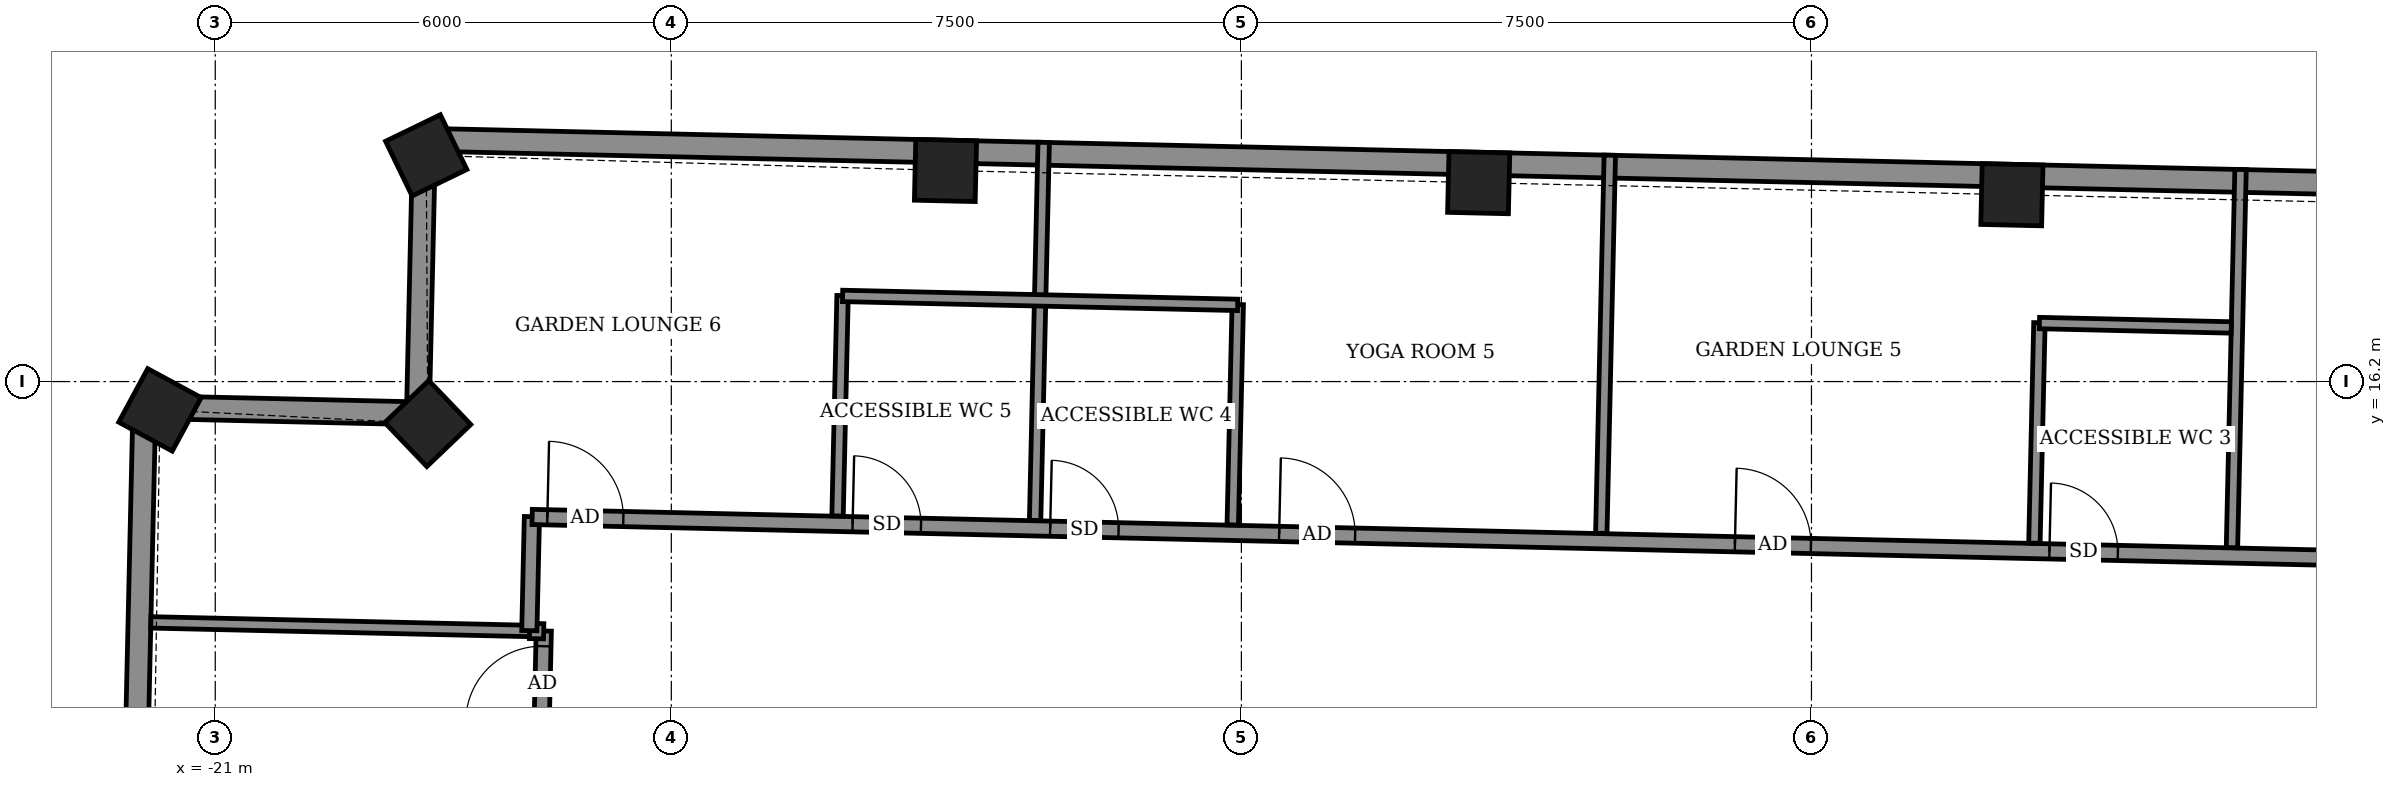
"""IFC4 building model, lengths in metres.
Left out: names, types, materials, properties, quantities, classifications, styles, units other than length and angle.
Written with IfcOpenShell. Run it as: python <this file> out.ifc"""

import sys

from ifc_helpers import new_model, si_unit, direction, frame, frame_2d, origin, origin_2d, place, context, subcontext, project, spatial, rectangle, extrude, element, fill, save


model = new_model("IFC4")
c1 = context("Model", 3, precision=1e-05, world=origin(), true_north=direction((0.0, 1.0)))
c2 = subcontext(c1, "Body", "Model", "MODEL_VIEW")
j1 = project(units=[si_unit("LENGTHUNIT", "METRE"), si_unit("PLANEANGLEUNIT", "RADIAN")], contexts=[c1])
p1 = place(None, origin())
s1 = spatial("IfcSite", under=j1, at=p1, CompositionType="ELEMENT")
p2 = place(p1, origin())
s2 = spatial("IfcBuilding", under=s1, at=p2, CompositionType="ELEMENT")
p3 = place(p2, frame((0.0, 0.0, 350.7)))
s3 = spatial("IfcBuildingStorey", under=s2, at=p3, CompositionType="ELEMENT", Elevation=350.7)
for number, where, z_axis, x_axis in (
    (1, (2.637, 18.658, -0.55), (0.0, 0.0, 1.0), (-1.0, 0.023, 0.0)),
    (2, (-4.378, 18.817, -0.55), (0.0, 0.0, 1.0), (-1.0, 0.023, 0.0)),
    (3, (-11.393, 18.977, -0.55), (0.0, 0.0, 1.0), (-1.0, 0.023, 0.0)),
    (4, (-18.225, 19.176, -0.55), (0.0, 0.0, 1.0), (-0.9, -0.436, 0.0)),
    (5, (-18.204, 15.648, -0.55), (0.0, 0.0, 1.0), (-0.723, -0.691, 0.0)),
    (6, (-21.727, 15.828, -0.55), (0.0, 0.0, 1.0), (-0.476, -0.879, 0.0)),
):
    element("IfcColumn", number, at=place(p3, frame(where, z_axis=z_axis, x_axis=x_axis)), inside=s3, PredefinedType="COLUMN", context=c2, shape_type="SweptSolid", body=[
        extrude(rectangle(XDim=0.8, YDim=0.8, at=origin_2d()), origin(), (0.0, 0.0, 1.0), 3.6),
    ])
p4 = place(p3, frame((23.537, 18.434, 0.0), z_axis=(0.0, 0.0, 1.0), x_axis=(-0.999742787513, 0.022679480066, 0.0)))
e7 = element("IfcWall", 7, at=p4, inside=s3, PredefinedType="SOLIDWALL", context=c2, shape_type="SweptSolid", body=[
    extrude(rectangle(XDim=41.8, YDim=0.3, at=frame_2d((20.9, 0.0))), origin(), (0.0, 0.0, 1.0), 2.5),
])
for number, where, z_axis, x_axis in (
    (8, (-18.252, 19.382, 0.0), (0.0, 0.0, 1.0), (-0.023, -1.0, 0.0)),
    (9, (-18.334, 15.783, 0.0), (0.0, 0.0, 1.0), (-1.0, 0.023, 0.0)),
):
    element("IfcWall", number, at=place(p3, frame(where, z_axis=z_axis, x_axis=x_axis)), inside=s3, PredefinedType="SOLIDWALL", context=c2, shape_type="SweptSolid", body=[
        extrude(rectangle(XDim=3.6, YDim=0.3, at=frame_2d((1.8, 0.0))), origin(), (0.0, 0.0, 1.0), 2.55),
    ])
p5 = place(p3, frame((-21.933, 15.865, 0.0), z_axis=(0.0, 0.0, 1.0), x_axis=(-0.022652795902, -0.999743392495, 0.0)))
e10 = element("IfcWall", 10, at=p5, inside=s3, PredefinedType="SOLIDWALL", context=c2, shape_type="SweptSolid", body=[
    extrude(rectangle(XDim=7.275, YDim=0.3, at=frame_2d((3.637, 0.0))), origin(), (0.0, 0.0, 1.0), 2.55),
])
p6 = place(p3, frame((-17.247, -12.149, 0.0), z_axis=(0.0, 0.0, 1.0), x_axis=(0.022696191528, 0.999742408268, 0.0)))
e11 = element("IfcWall", 11, at=p6, inside=s3, PredefinedType="PARTITIONING", context=c2, shape_type="SweptSolid", body=[
    extrude(rectangle(XDim=25.074, YDim=0.2, at=frame_2d((12.537, 0.0))), origin(), (0.0, 0.0, 1.0), 3.05),
])
p7 = place(p6, frame((23.874, 0.0, 0.0)))
e12 = element("IfcOpeningElement", 12, at=p7, cuts=e11, PredefinedType="OPENING", context=c2, shape_type="SweptSolid", body=[
    extrude(rectangle(XDim=1.0, YDim=2.1, at=frame_2d((0.5, 1.05))), frame((0.0, 0.11, 0.0), z_axis=(0.0, -1.0, 0.0), x_axis=(1.0, 0.0, 0.0)), (0.0, 0.0, 1.0), 0.22),
])
p8 = place(p6, frame((18.896, 0.0, 0.0)))
e13 = element("IfcOpeningElement", 13, at=p8, cuts=e11, PredefinedType="OPENING", context=c2, shape_type="SweptSolid", body=[
    extrude(rectangle(XDim=1.0, YDim=2.1, at=frame_2d((0.5, 1.05))), frame((0.0, 0.11, 0.0), z_axis=(0.0, -1.0, 0.0), x_axis=(1.0, 0.0, 0.0)), (0.0, 0.0, 1.0), 0.22),
])
p9 = place(p6, frame((12.675, 0.0, 0.0)))
e14 = element("IfcOpeningElement", 14, at=p9, cuts=e11, PredefinedType="OPENING", context=c2, shape_type="SweptSolid", body=[
    extrude(rectangle(XDim=1.0, YDim=2.1, at=frame_2d((0.5, 1.05))), frame((0.0, 0.11, 0.0), z_axis=(0.0, -1.0, 0.0), x_axis=(1.0, 0.0, 0.0)), (0.0, 0.0, 1.0), 0.22),
])
p10 = place(p6, frame((8.775, 0.0, 0.0)))
e15 = element("IfcOpeningElement", 15, at=p10, cuts=e11, PredefinedType="OPENING", context=c2, shape_type="SweptSolid", body=[
    extrude(rectangle(XDim=0.9, YDim=2.1, at=frame_2d((0.45, 1.05))), frame((0.0, 0.11, 0.0), z_axis=(0.0, -1.0, 0.0), x_axis=(1.0, 0.0, 0.0)), (0.0, 0.0, 1.0), 0.22),
])
p11 = place(p6, frame((5.045, 0.0, 0.0)))
e16 = element("IfcOpeningElement", 16, at=p11, cuts=e11, PredefinedType="OPENING", context=c2, shape_type="SweptSolid", body=[
    extrude(rectangle(XDim=1.0, YDim=2.1, at=frame_2d((0.5, 1.05))), frame((0.0, 0.11, 0.0), z_axis=(0.0, -1.0, 0.0), x_axis=(1.0, 0.0, 0.0)), (0.0, 0.0, 1.0), 0.22),
])
p12 = place(p3, frame((-21.847, 13.032, 0.0), z_axis=(0.0, 0.0, 1.0), x_axis=(0.99974309766, -0.022665804241, 0.0)))
e17 = element("IfcWall", 17, at=p12, inside=s3, PredefinedType="PARTITIONING", context=c2, shape_type="SweptSolid", body=[
    extrude(rectangle(XDim=4.987, YDim=0.15, at=frame_2d((2.494, 0.0))), origin(), (0.0, 0.0, 1.0), 2.55),
])
p13 = place(p3, frame((-16.865, 12.919, 0.0), z_axis=(0.0, 0.0, 1.0), x_axis=(0.999779627982, -0.020992748094, 0.0)))
e18 = element("IfcWall", 18, at=p13, inside=s3, PredefinedType="PARTITIONING", context=c2, shape_type="SweptSolid", body=[
    extrude(rectangle(XDim=0.186, YDim=0.2, at=frame_2d((0.093, 0.0))), origin(), (0.0, 0.0, 1.0), 3.05),
])
p14 = place(p3, frame((-16.868, 12.923, 0.0), z_axis=(0.0, 0.0, 1.0), x_axis=(0.022617910375, 0.999744182344, 0.0)))
e19 = element("IfcWall", 19, at=p14, inside=s3, PredefinedType="PARTITIONING", context=c2, shape_type="SweptSolid", body=[
    extrude(rectangle(XDim=1.5, YDim=0.2, at=frame_2d((0.75, 0.0))), origin(), (0.0, 0.0, 1.0), 3.05),
])
p15 = place(p3, frame((-16.831, 14.419, 0.0), z_axis=(0.0, 0.0, 1.0), x_axis=(0.999742531431, -0.022690765715, 0.0)))
e20 = element("IfcWall", 20, at=p15, inside=s3, PredefinedType="PARTITIONING", context=c2, shape_type="SweptSolid", body=[
    extrude(rectangle(XDim=38.734, YDim=0.2, at=frame_2d((19.367, 0.0))), origin(), (0.0, 0.0, 1.0), 3.05),
])
p16 = place(p15, frame((35.977, 0.0, 0.0)))
e21 = element("IfcOpeningElement", 21, at=p16, cuts=e20, PredefinedType="OPENING", context=c2, shape_type="SweptSolid", body=[
    extrude(rectangle(XDim=1.0, YDim=2.1, at=frame_2d((0.5, 1.05))), frame((0.0, 0.11, 0.0), z_axis=(0.0, -1.0, 0.0), x_axis=(1.0, 0.0, 0.0)), (0.0, 0.0, 1.0), 0.22),
])
p17 = place(p15, frame((33.167, 0.0, 0.0)))
e22 = element("IfcOpeningElement", 22, at=p17, cuts=e20, PredefinedType="OPENING", context=c2, shape_type="SweptSolid", body=[
    extrude(rectangle(XDim=0.9, YDim=2.1, at=frame_2d((0.45, 1.05))), frame((0.0, 0.11, 0.0), z_axis=(0.0, -1.0, 0.0), x_axis=(1.0, 0.0, 0.0)), (0.0, 0.0, 1.0), 0.22),
])
p18 = place(p15, frame((28.467, 0.0, 0.0)))
e23 = element("IfcOpeningElement", 23, at=p18, cuts=e20, PredefinedType="OPENING", context=c2, shape_type="SweptSolid", body=[
    extrude(rectangle(XDim=1.0, YDim=2.1, at=frame_2d((0.5, 1.05))), frame((0.0, 0.11, 0.0), z_axis=(0.0, -1.0, 0.0), x_axis=(1.0, 0.0, 0.0)), (0.0, 0.0, 1.0), 0.22),
])
p19 = place(p15, frame((30.767, 0.0, 0.0)))
e24 = element("IfcOpeningElement", 24, at=p19, cuts=e20, PredefinedType="OPENING", context=c2, shape_type="SweptSolid", body=[
    extrude(rectangle(XDim=0.9, YDim=2.1, at=frame_2d((0.45, 1.05))), frame((0.0, 0.11, 0.0), z_axis=(0.0, -1.0, 0.0), x_axis=(1.0, 0.0, 0.0)), (0.0, 0.0, 1.0), 0.22),
])
p20 = place(p15, frame((23.541, 0.0, 0.0)))
e25 = element("IfcOpeningElement", 25, at=p20, cuts=e20, PredefinedType="OPENING", context=c2, shape_type="SweptSolid", body=[
    extrude(rectangle(XDim=1.0, YDim=2.1, at=frame_2d((0.5, 1.05))), frame((0.0, 0.11, 0.0), z_axis=(0.0, -1.0, 0.0), x_axis=(1.0, 0.0, 0.0)), (0.0, 0.0, 1.0), 0.22),
])
p21 = place(p15, frame((15.828, 0.0, 0.0)))
e26 = element("IfcOpeningElement", 26, at=p21, cuts=e20, PredefinedType="OPENING", context=c2, shape_type="SweptSolid", body=[
    extrude(rectangle(XDim=1.0, YDim=2.1, at=frame_2d((0.5, 1.05))), frame((0.0, 0.11, 0.0), z_axis=(0.0, -1.0, 0.0), x_axis=(1.0, 0.0, 0.0)), (0.0, 0.0, 1.0), 0.22),
])
p22 = place(p15, frame((19.967, 0.0, 0.0)))
e27 = element("IfcOpeningElement", 27, at=p22, cuts=e20, PredefinedType="OPENING", context=c2, shape_type="SweptSolid", body=[
    extrude(rectangle(XDim=0.9, YDim=2.1, at=frame_2d((0.45, 1.05))), frame((0.0, 0.11, 0.0), z_axis=(0.0, -1.0, 0.0), x_axis=(1.0, 0.0, 0.0)), (0.0, 0.0, 1.0), 0.22),
])
p23 = place(p15, frame((9.83, 0.0, 0.0)))
e28 = element("IfcOpeningElement", 28, at=p23, cuts=e20, PredefinedType="OPENING", context=c2, shape_type="SweptSolid", body=[
    extrude(rectangle(XDim=1.0, YDim=2.1, at=frame_2d((0.5, 1.05))), frame((0.0, 0.11, 0.0), z_axis=(0.0, -1.0, 0.0), x_axis=(1.0, 0.0, 0.0)), (0.0, 0.0, 1.0), 0.22),
])
p24 = place(p15, frame((6.817, 0.0, 0.0)))
e29 = element("IfcOpeningElement", 29, at=p24, cuts=e20, PredefinedType="OPENING", context=c2, shape_type="SweptSolid", body=[
    extrude(rectangle(XDim=0.9, YDim=2.1, at=frame_2d((0.45, 1.05))), frame((0.0, 0.11, 0.0), z_axis=(0.0, -1.0, 0.0), x_axis=(1.0, 0.0, 0.0)), (0.0, 0.0, 1.0), 0.22),
])
p25 = place(p15, frame((0.2, 0.0, 0.0)))
e30 = element("IfcOpeningElement", 30, at=p25, cuts=e20, PredefinedType="OPENING", context=c2, shape_type="SweptSolid", body=[
    extrude(rectangle(XDim=1.0, YDim=2.1, at=frame_2d((0.5, 1.05))), frame((0.0, 0.11, 0.0), z_axis=(0.0, -1.0, 0.0), x_axis=(1.0, 0.0, 0.0)), (0.0, 0.0, 1.0), 0.22),
])
p26 = place(p15, frame((4.217, 0.0, 0.0)))
e31 = element("IfcOpeningElement", 31, at=p26, cuts=e20, PredefinedType="OPENING", context=c2, shape_type="SweptSolid", body=[
    extrude(rectangle(XDim=0.9, YDim=2.1, at=frame_2d((0.45, 1.05))), frame((0.0, 0.11, 0.0), z_axis=(0.0, -1.0, 0.0), x_axis=(1.0, 0.0, 0.0)), (0.0, 0.0, 1.0), 0.22),
])
p27 = place(p3, frame((-12.813, 14.432, 0.0), z_axis=(0.0, 0.0, 1.0), x_axis=(0.022730967319, 0.999741618182, 0.0)))
e32 = element("IfcWall", 32, at=p27, inside=s3, PredefinedType="PARTITIONING", context=c2, shape_type="SweptSolid", body=[
    extrude(rectangle(XDim=2.9, YDim=0.15, at=frame_2d((1.45, 0.0))), origin(), (0.0, 0.0, 1.0), 3.05),
])
p28 = place(p3, frame((-10.214, 14.373, 0.0), z_axis=(0.0, 0.0, 1.0), x_axis=(0.022720290659, 0.999741860878, 0.0)))
e33 = element("IfcWall", 33, at=p28, inside=s3, PredefinedType="PARTITIONING", context=c2, shape_type="SweptSolid", body=[
    extrude(rectangle(XDim=4.975, YDim=0.15, at=frame_2d((2.488, 0.0))), origin(), (0.0, 0.0, 1.0), 2.5),
])
p29 = place(p3, frame((-7.614, 14.314, 0.0), z_axis=(0.0, 0.0, 1.0), x_axis=(0.022732880677, 0.999741574676, 0.0)))
e34 = element("IfcWall", 34, at=p29, inside=s3, PredefinedType="PARTITIONING", context=c2, shape_type="SweptSolid", body=[
    extrude(rectangle(XDim=2.9, YDim=0.15, at=frame_2d((1.45, 0.0))), origin(), (0.0, 0.0, 1.0), 3.05),
])
p30 = place(p3, frame((-2.765, 14.204, 0.0), z_axis=(0.0, 0.0, 1.0), x_axis=(0.022475055762, 0.999747404032, 0.0)))
e35 = element("IfcWall", 35, at=p30, inside=s3, PredefinedType="PARTITIONING", context=c2, shape_type="SweptSolid", body=[
    extrude(rectangle(XDim=4.975, YDim=0.15, at=frame_2d((2.488, 0.0))), origin(), (0.0, 0.0, 1.0), 2.5),
])
p31 = place(p3, frame((2.933, 14.074, 0.0), z_axis=(0.0, 0.0, 1.0), x_axis=(0.022723317103, 0.999741792094, 0.0)))
e36 = element("IfcWall", 36, at=p31, inside=s3, PredefinedType="PARTITIONING", context=c2, shape_type="SweptSolid", body=[
    extrude(rectangle(XDim=2.901, YDim=0.15, at=frame_2d((1.45, 0.0))), origin(), (0.0, 0.0, 1.0), 3.05),
])
p32 = place(p3, frame((5.532, 14.015, 0.0), z_axis=(0.0, 0.0, 1.0), x_axis=(0.022714718825, 0.999741987489, 0.0)))
e37 = element("IfcWall", 37, at=p32, inside=s3, PredefinedType="PARTITIONING", context=c2, shape_type="SweptSolid", body=[
    extrude(rectangle(XDim=4.976, YDim=0.15, at=frame_2d((2.488, 0.0))), origin(), (0.0, 0.0, 1.0), 2.5),
])
p33 = place(p3, frame((-12.747, 17.327, 0.0), z_axis=(0.0, 0.0, 1.0), x_axis=(0.999742780105, -0.022679806622, 0.0)))
e38 = element("IfcWall", 38, at=p33, inside=s3, PredefinedType="PARTITIONING", context=c2, shape_type="SweptSolid", body=[
    extrude(rectangle(XDim=5.199, YDim=0.15, at=frame_2d((2.6, 0.0))), origin(), (0.0, 0.0, 1.0), 3.05),
])
p34 = place(p3, frame((2.999, 16.97, 0.0), z_axis=(0.0, 0.0, 1.0), x_axis=(0.999737322729, -0.022919108675, 0.0)))
e39 = element("IfcWall", 39, at=p34, inside=s3, PredefinedType="PARTITIONING", context=c2, shape_type="SweptSolid", body=[
    extrude(rectangle(XDim=2.525, YDim=0.15, at=frame_2d((1.262, 0.0))), origin(), (0.0, 0.0, 1.0), 3.05),
])
p35 = place(p21, origin())
e40 = element("IfcDoor", 40, at=p35, inside=s3, OperationType="SINGLE_SWING_LEFT", PredefinedType="DOOR", context=c2, shape_type="SweptSolid", body=[
    extrude(rectangle(XDim=1.0, YDim=2.1, at=frame_2d((0.5, 1.05))), frame((0.0, 0.025, 0.0), z_axis=(0.0, -1.0, 0.0), x_axis=(1.0, 0.0, 0.0)), (0.0, 0.0, 1.0), 0.05),
])
fill(e26, e40)
p36 = place(p22, origin())
e41 = element("IfcDoor", 41, at=p36, inside=s3, OperationType="SINGLE_SWING_LEFT", PredefinedType="DOOR", context=c2, shape_type="SweptSolid", body=[
    extrude(rectangle(XDim=0.9, YDim=2.1, at=frame_2d((0.45, 1.05))), frame((0.0, 0.025, 0.0), z_axis=(0.0, -1.0, 0.0), x_axis=(1.0, 0.0, 0.0)), (0.0, 0.0, 1.0), 0.05),
])
fill(e27, e41)
p37 = place(p23, origin())
e42 = element("IfcDoor", 42, at=p37, inside=s3, OperationType="SINGLE_SWING_RIGHT", PredefinedType="DOOR", context=c2, shape_type="SweptSolid", body=[
    extrude(rectangle(XDim=1.0, YDim=2.1, at=frame_2d((0.5, 1.05))), frame((0.0, 0.025, 0.0), z_axis=(0.0, -1.0, 0.0), x_axis=(1.0, 0.0, 0.0)), (0.0, 0.0, 1.0), 0.05),
])
fill(e28, e42)
p38 = place(p24, origin())
e43 = element("IfcDoor", 43, at=p38, inside=s3, OperationType="SINGLE_SWING_RIGHT", PredefinedType="DOOR", context=c2, shape_type="SweptSolid", body=[
    extrude(rectangle(XDim=0.9, YDim=2.1, at=frame_2d((0.45, 1.05))), frame((0.0, 0.025, 0.0), z_axis=(0.0, -1.0, 0.0), x_axis=(1.0, 0.0, 0.0)), (0.0, 0.0, 1.0), 0.05),
])
fill(e29, e43)
p39 = place(p25, origin())
e44 = element("IfcDoor", 44, at=p39, inside=s3, OperationType="SINGLE_SWING_LEFT", PredefinedType="DOOR", context=c2, shape_type="SweptSolid", body=[
    extrude(rectangle(XDim=1.0, YDim=2.1, at=frame_2d((0.5, 1.05))), frame((0.0, 0.025, 0.0), z_axis=(0.0, -1.0, 0.0), x_axis=(1.0, 0.0, 0.0)), (0.0, 0.0, 1.0), 0.05),
])
fill(e30, e44)
p40 = place(p26, origin())
e45 = element("IfcDoor", 45, at=p40, inside=s3, OperationType="SINGLE_SWING_LEFT", PredefinedType="DOOR", context=c2, shape_type="SweptSolid", body=[
    extrude(rectangle(XDim=0.9, YDim=2.1, at=frame_2d((0.45, 1.05))), frame((0.0, 0.025, 0.0), z_axis=(0.0, -1.0, 0.0), x_axis=(1.0, 0.0, 0.0)), (0.0, 0.0, 1.0), 0.05),
])
fill(e31, e45)
p41 = place(p7, origin())
e46 = element("IfcDoor", 46, at=p41, inside=s3, OperationType="SINGLE_SWING_RIGHT", PredefinedType="DOOR", context=c2, shape_type="SweptSolid", body=[
    extrude(rectangle(XDim=1.0, YDim=2.1, at=frame_2d((0.5, 1.05))), frame((0.0, 0.025, 0.0), z_axis=(0.0, -1.0, 0.0), x_axis=(1.0, 0.0, 0.0)), (0.0, 0.0, 1.0), 0.05),
])
fill(e12, e46)
save(model, sys.argv[1])
